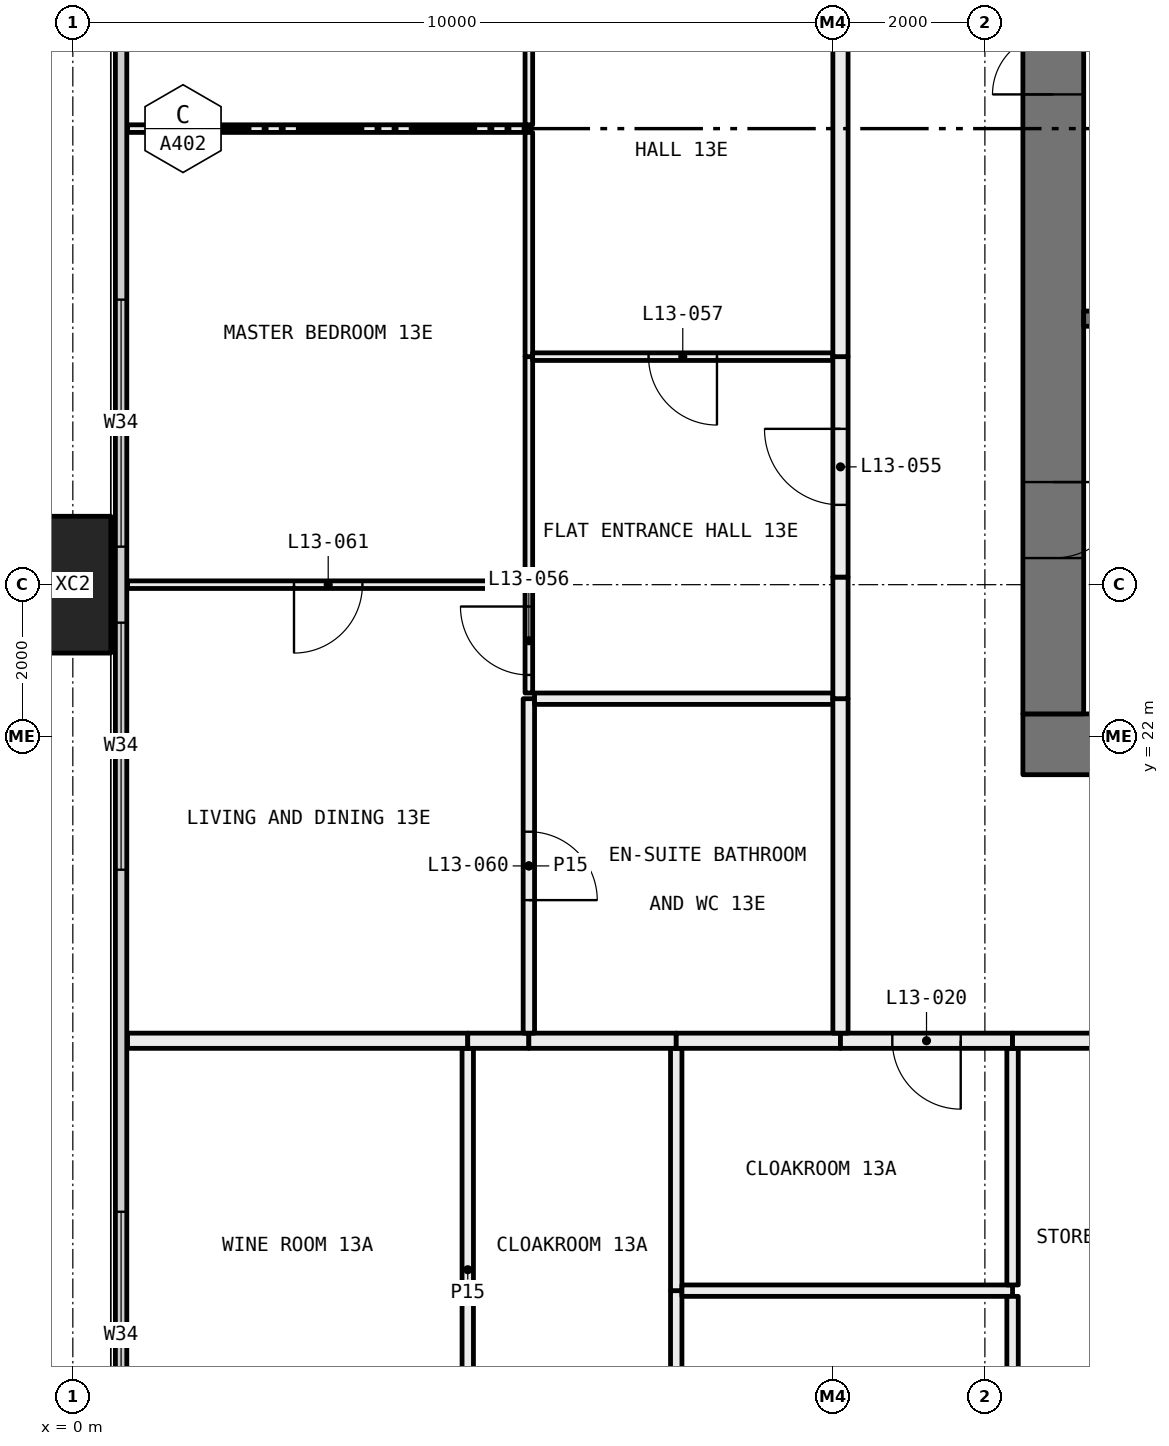
"""IFC4 building model, lengths in metres.
Left out: names, types, materials, properties, quantities, classifications, styles, units other than length and angle.
Written with IfcOpenShell. Run it as: python <this file> out.ifc"""

import sys

from ifc_helpers import new_model, si_unit, direction, frame, frame_2d, origin, origin_2d, place, context, subcontext, project, spatial, rectangle, hollow_rectangle, extrude, element, fill, save


model = new_model("IFC4")
c1 = context("Model", 3, precision=1e-05, world=origin(), true_north=direction((0.0, 1.0)))
c2 = subcontext(c1, "Body", "Model", "MODEL_VIEW")
j1 = project(units=[si_unit("LENGTHUNIT", "METRE"), si_unit("PLANEANGLEUNIT", "RADIAN")], contexts=[c1])
p1 = place(None, origin())
s1 = spatial("IfcSite", under=j1, at=p1, CompositionType="ELEMENT")
p2 = place(p1, origin())
s2 = spatial("IfcBuilding", under=s1, at=p2, CompositionType="ELEMENT")
p3 = place(p2, frame((0.0, 0.0, 57.6)))
s3 = spatial("IfcBuildingStorey", under=s2, at=p3, CompositionType="ELEMENT", Elevation=57.6)
p4 = place(p3, frame((0.0, 24.0, -0.4), z_axis=(0.0, 0.0, 1.0), x_axis=(0.0, 1.0, 0.0)))
e1 = element("IfcColumn", 1, at=p4, inside=s3, PredefinedType="COLUMN", context=c2, shape_type="SweptSolid", body=[
    extrude(hollow_rectangle(XDim=1.8, YDim=1.0, WallThickness=0.07, at=origin_2d()), origin(), (0.0, 0.0, 1.0), 3.45),
])
p5 = place(p3, frame((0.635, 6.71, 0.0), z_axis=(0.0, 0.0, 1.0), x_axis=(0.0, 1.0, 0.0)))
e2 = element("IfcWall", 2, at=p5, inside=s3, PredefinedType="ELEMENTEDWALL", context=c2, shape_type="SweptSolid", body=[
    extrude(rectangle(XDim=34.58, YDim=0.15, at=frame_2d((17.29, 0.0))), origin(), (0.0, 0.0, 1.0), 3.05),
])
p6 = place(p5, frame((0.29, 0.0, 0.45)))
e3 = element("IfcOpeningElement", 3, at=p6, cuts=e2, PredefinedType="OPENING", context=c2, shape_type="SweptSolid", body=[
    extrude(rectangle(XDim=4.5, YDim=2.55, at=frame_2d((2.25, 1.275))), frame((0.0, 0.085, 0.0), z_axis=(0.0, -1.0, 0.0), x_axis=(1.0, 0.0, 0.0)), (0.0, 0.0, 1.0), 0.17),
])
p7 = place(p5, frame((5.79, 0.0, 0.45)))
e4 = element("IfcOpeningElement", 4, at=p7, cuts=e2, PredefinedType="OPENING", context=c2, shape_type="SweptSolid", body=[
    extrude(rectangle(XDim=3.25, YDim=2.55, at=frame_2d((1.625, 1.275))), frame((0.0, 0.085, 0.0), z_axis=(0.0, -1.0, 0.0), x_axis=(1.0, 0.0, 0.0)), (0.0, 0.0, 1.0), 0.17),
])
p8 = place(p5, frame((13.54, 0.0, 0.45)))
e5 = element("IfcOpeningElement", 5, at=p8, cuts=e2, PredefinedType="OPENING", context=c2, shape_type="SweptSolid", body=[
    extrude(rectangle(XDim=3.25, YDim=2.55, at=frame_2d((1.625, 1.275))), frame((0.0, 0.085, 0.0), z_axis=(0.0, -1.0, 0.0), x_axis=(1.0, 0.0, 0.0)), (0.0, 0.0, 1.0), 0.17),
])
p9 = place(p5, frame((17.79, 0.0, 0.45)))
e6 = element("IfcOpeningElement", 6, at=p9, cuts=e2, PredefinedType="OPENING", context=c2, shape_type="SweptSolid", body=[
    extrude(rectangle(XDim=3.25, YDim=2.55, at=frame_2d((1.625, 1.275))), frame((0.0, 0.085, 0.0), z_axis=(0.0, -1.0, 0.0), x_axis=(1.0, 0.0, 0.0)), (0.0, 0.0, 1.0), 0.17),
])
p10 = place(p5, frame((26.79, 0.0, 0.45)))
e7 = element("IfcOpeningElement", 7, at=p10, cuts=e2, PredefinedType="OPENING", context=c2, shape_type="SweptSolid", body=[
    extrude(rectangle(XDim=2.0, YDim=2.55, at=frame_2d((1.0, 1.275))), frame((0.0, 0.085, 0.0), z_axis=(0.0, -1.0, 0.0), x_axis=(1.0, 0.0, 0.0)), (0.0, 0.0, 1.0), 0.17),
])
p11 = place(p5, frame((29.79, 0.0, 0.45)))
e8 = element("IfcOpeningElement", 8, at=p11, cuts=e2, PredefinedType="OPENING", context=c2, shape_type="SweptSolid", body=[
    extrude(rectangle(XDim=4.5, YDim=2.55, at=frame_2d((2.25, 1.275))), frame((0.0, 0.085, 0.0), z_axis=(0.0, -1.0, 0.0), x_axis=(1.0, 0.0, 0.0)), (0.0, 0.0, 1.0), 0.17),
])
p12 = place(p3, frame((5.196, 12.075, 0.0), z_axis=(0.0, 0.0, 1.0), x_axis=(0.0, 1.0, 0.0)))
e9 = element("IfcWall", 9, at=p12, inside=s3, PredefinedType="PARTITIONING", context=c2, shape_type="SweptSolid", body=[
    extrude(rectangle(XDim=5.825, YDim=0.15, at=frame_2d((2.913, 0.0))), origin(), (0.0, 0.0, 1.0), 2.45),
])
p13 = place(p3, frame((5.196, 18.0, 0.0), z_axis=(0.0, 0.0, 1.0), x_axis=(-1.0, 0.0, 0.0)))
e10 = element("IfcWall", 10, at=p13, inside=s3, PredefinedType="PARTITIONING", context=c2, shape_type="SweptSolid", body=[
    extrude(rectangle(XDim=4.476, YDim=0.2, at=frame_2d((2.238, 0.0))), origin(), (0.0, 0.0, 1.0), 3.05),
])
p14 = place(p3, frame((7.939, 12.075, 0.0), z_axis=(0.0, 0.0, 1.0), x_axis=(0.0, 1.0, 0.0)))
e11 = element("IfcWall", 11, at=p14, inside=s3, PredefinedType="PARTITIONING", context=c2, shape_type="SweptSolid", body=[
    extrude(rectangle(XDim=2.637, YDim=0.15, at=frame_2d((1.318, 0.0))), origin(), (0.0, 0.0, 1.0), 2.45),
])
p15 = place(p3, frame((7.939, 14.712, 0.0), z_axis=(0.0, 0.0, 1.0), x_axis=(0.0, 1.0, 0.0)))
e12 = element("IfcWall", 12, at=p15, inside=s3, PredefinedType="PARTITIONING", context=c2, shape_type="SweptSolid", body=[
    extrude(rectangle(XDim=3.188, YDim=0.15, at=frame_2d((1.594, 0.0))), origin(), (0.0, 0.0, 1.0), 3.05),
])
p16 = place(p3, frame((6.0, 18.0, 0.0), z_axis=(0.0, 0.0, 1.0), x_axis=(-1.0, 0.0, 0.0)))
e13 = element("IfcWall", 13, at=p16, inside=s3, PredefinedType="PARTITIONING", context=c2, shape_type="SweptSolid", body=[
    extrude(rectangle(XDim=0.804, YDim=0.2, at=frame_2d((0.402, 0.0))), origin(), (0.0, 0.0, 1.0), 3.05),
])
p17 = place(p3, frame((7.939, 18.0, 0.0), z_axis=(0.0, 0.0, 1.0), x_axis=(-1.0, 0.0, 0.0)))
e14 = element("IfcWall", 14, at=p17, inside=s3, PredefinedType="PARTITIONING", context=c2, shape_type="SweptSolid", body=[
    extrude(rectangle(XDim=1.939, YDim=0.2, at=frame_2d((0.969, 0.0))), origin(), (0.0, 0.0, 1.0), 3.05),
])
p18 = place(p3, frame((12.364, 14.712, 0.0), z_axis=(0.0, 0.0, 1.0), x_axis=(-1.0, 0.0, 0.0)))
e15 = element("IfcWall", 15, at=p18, inside=s3, PredefinedType="PARTITIONING", context=c2, shape_type="SweptSolid", body=[
    extrude(rectangle(XDim=4.35, YDim=0.15, at=frame_2d((2.175, 0.0))), origin(), (0.0, 0.0, 1.0), 3.05),
])
p19 = place(p3, frame((12.364, 12.8, 0.0), z_axis=(0.0, 0.0, 1.0), x_axis=(0.0, 1.0, 0.0)))
e16 = element("IfcWall", 16, at=p19, inside=s3, PredefinedType="PARTITIONING", context=c2, shape_type="SweptSolid", body=[
    extrude(rectangle(XDim=1.837, YDim=0.15, at=frame_2d((0.918, 0.0))), origin(), (0.0, 0.0, 1.0), 3.05),
])
p20 = place(p3, frame((12.364, 14.787, 0.0), z_axis=(0.0, 0.0, 1.0), x_axis=(0.0, 1.0, 0.0)))
e17 = element("IfcWall", 17, at=p20, inside=s3, PredefinedType="PARTITIONING", context=c2, shape_type="SweptSolid", body=[
    extrude(rectangle(XDim=3.113, YDim=0.15, at=frame_2d((1.556, 0.0))), origin(), (0.0, 0.0, 1.0), 3.05),
])
p21 = place(p3, frame((10.1, 18.0, 0.0), z_axis=(0.0, 0.0, 1.0), x_axis=(-1.0, 0.0, 0.0)))
e18 = element("IfcWall", 18, at=p21, inside=s3, PredefinedType="PARTITIONING", context=c2, shape_type="SweptSolid", body=[
    extrude(rectangle(XDim=2.161, YDim=0.2, at=frame_2d((1.081, 0.0))), origin(), (0.0, 0.0, 1.0), 3.05),
])
p22 = place(p3, frame((12.364, 18.0, 0.0), z_axis=(0.0, 0.0, 1.0), x_axis=(-1.0, 0.0, 0.0)))
e19 = element("IfcWall", 19, at=p22, inside=s3, PredefinedType="PARTITIONING", context=c2, shape_type="SweptSolid", body=[
    extrude(rectangle(XDim=2.264, YDim=0.2, at=frame_2d((1.132, 0.0))), origin(), (0.0, 0.0, 1.0), 3.05),
])
p23 = place(p22, frame((0.682, 0.0, 0.0)))
e20 = element("IfcOpeningElement", 20, at=p23, cuts=e19, PredefinedType="OPENING", context=c2, shape_type="SweptSolid", body=[
    extrude(rectangle(XDim=0.9, YDim=2.1, at=frame_2d((0.45, 1.05))), frame((0.0, 0.11, 0.0), z_axis=(0.0, -1.0, 0.0), x_axis=(1.0, 0.0, 0.0)), (0.0, 0.0, 1.0), 0.22),
])
p24 = place(p3, frame((14.364, 18.0, 0.0), z_axis=(0.0, 0.0, 1.0), x_axis=(-1.0, 0.0, 0.0)))
e21 = element("IfcWall", 21, at=p24, inside=s3, PredefinedType="PARTITIONING", context=c2, shape_type="SweptSolid", body=[
    extrude(rectangle(XDim=2.0, YDim=0.2, at=frame_2d((1.0, 0.0))), origin(), (0.0, 0.0, 1.0), 3.05),
])
p25 = place(p3, frame((6.0, 24.0, 0.0), z_axis=(0.0, 0.0, 1.0), x_axis=(-1.0, 0.0, 0.0)))
e22 = element("IfcWall", 22, at=p25, inside=s3, PredefinedType="PARTITIONING", context=c2, shape_type="SweptSolid", body=[
    extrude(rectangle(XDim=5.28, YDim=0.1, at=frame_2d((2.64, 0.0))), origin(), (0.0, 0.0, 1.0), 2.45),
])
p26 = place(p25, frame((2.19, 0.0, 0.0)))
e23 = element("IfcOpeningElement", 23, at=p26, cuts=e22, PredefinedType="OPENING", context=c2, shape_type="SweptSolid", body=[
    extrude(rectangle(XDim=0.9, YDim=2.1, at=frame_2d((0.45, 1.05))), frame((0.0, 0.06, 0.0), z_axis=(0.0, -1.0, 0.0), x_axis=(1.0, 0.0, 0.0)), (0.0, 0.0, 1.0), 0.12),
])
p27 = place(p3, frame((6.0, 18.1, 0.0), z_axis=(0.0, 0.0, 1.0), x_axis=(0.0, 1.0, 0.0)))
e24 = element("IfcWall", 24, at=p27, inside=s3, PredefinedType="PARTITIONING", context=c2, shape_type="SweptSolid", body=[
    extrude(rectangle(XDim=4.4, YDim=0.15, at=frame_2d((2.2, 0.0))), origin(), (0.0, 0.0, 1.0), 3.05),
])
p28 = place(p27, frame((1.75, 0.0, 0.0)))
e25 = element("IfcOpeningElement", 25, at=p28, cuts=e24, PredefinedType="OPENING", context=c2, shape_type="SweptSolid", body=[
    extrude(rectangle(XDim=0.9, YDim=2.1, at=frame_2d((0.45, 1.05))), frame((0.0, 0.085, 0.0), z_axis=(0.0, -1.0, 0.0), x_axis=(1.0, 0.0, 0.0)), (0.0, 0.0, 1.0), 0.17),
])
p29 = place(p3, frame((6.0, 22.575, 0.0), z_axis=(0.0, 0.0, 1.0), x_axis=(0.0, 1.0, 0.0)))
e26 = element("IfcWall", 26, at=p29, inside=s3, PredefinedType="PARTITIONING", context=c2, shape_type="SweptSolid", body=[
    extrude(rectangle(XDim=1.375, YDim=0.1, at=frame_2d((0.688, 0.0))), origin(), (0.0, 0.0, 1.0), 2.45),
])
p30 = place(p29, frame((0.238, 0.0, 0.0)))
e27 = element("IfcOpeningElement", 27, at=p30, cuts=e26, PredefinedType="OPENING", context=c2, shape_type="SweptSolid", body=[
    extrude(rectangle(XDim=0.9, YDim=2.1, at=frame_2d((0.45, 1.05))), frame((0.0, 0.06, 0.0), z_axis=(0.0, -1.0, 0.0), x_axis=(1.0, 0.0, 0.0)), (0.0, 0.0, 1.0), 0.12),
])
p31 = place(p3, frame((6.0, 30.0, 0.0), z_axis=(0.0, 0.0, 1.0), x_axis=(-1.0, 0.0, 0.0)))
e28 = element("IfcWall", 28, at=p31, inside=s3, PredefinedType="PARTITIONING", context=c2, shape_type="SweptSolid", body=[
    extrude(rectangle(XDim=5.28, YDim=0.1, at=frame_2d((2.64, 0.0))), origin(), (0.0, 0.0, 1.0), 3.05),
])
p32 = place(p3, frame((6.0, 24.05, 0.0), z_axis=(0.0, 0.0, 1.0), x_axis=(0.0, 1.0, 0.0)))
e29 = element("IfcWall", 29, at=p32, inside=s3, PredefinedType="PARTITIONING", context=c2, shape_type="SweptSolid", body=[
    extrude(rectangle(XDim=2.95, YDim=0.1, at=frame_2d((1.475, 0.0))), origin(), (0.0, 0.0, 1.0), 2.45),
])
p33 = place(p3, frame((6.0, 27.0, 0.0), z_axis=(0.0, 0.0, 1.0), x_axis=(0.0, 1.0, 0.0)))
e30 = element("IfcWall", 30, at=p33, inside=s3, PredefinedType="PARTITIONING", context=c2, shape_type="SweptSolid", body=[
    extrude(rectangle(XDim=2.95, YDim=0.1, at=frame_2d((1.475, 0.0))), origin(), (0.0, 0.0, 1.0), 3.05),
])
p34 = place(p3, frame((6.0, 30.05, 0.0), z_axis=(0.0, 0.0, 1.0), x_axis=(0.0, 1.0, 0.0)))
e31 = element("IfcWall", 31, at=p34, inside=s3, PredefinedType="PARTITIONING", context=c2, shape_type="SweptSolid", body=[
    extrude(rectangle(XDim=5.9, YDim=0.1, at=frame_2d((2.95, 0.0))), origin(), (0.0, 0.0, 1.0), 2.45),
])
p35 = place(p34, frame((2.5, 0.0, 0.0)))
e32 = element("IfcOpeningElement", 32, at=p35, cuts=e31, PredefinedType="OPENING", context=c2, shape_type="SweptSolid", body=[
    extrude(rectangle(XDim=0.9, YDim=2.1, at=frame_2d((0.45, 1.05))), frame((0.0, 0.06, 0.0), z_axis=(0.0, -1.0, 0.0), x_axis=(1.0, 0.0, 0.0)), (0.0, 0.0, 1.0), 0.12),
])
p36 = place(p3, frame((10.0, 22.5, 0.0), z_axis=(0.0, 0.0, 1.0), x_axis=(-1.0, 0.0, 0.0)))
e33 = element("IfcWall", 33, at=p36, inside=s3, PredefinedType="PARTITIONING", context=c2, shape_type="SweptSolid", body=[
    extrude(rectangle(XDim=3.925, YDim=0.15, at=frame_2d((1.962, 0.0))), origin(), (0.0, 0.0, 1.0), 3.05),
])
p37 = place(p3, frame((10.1, 18.1, 0.0), z_axis=(0.0, 0.0, 1.0), x_axis=(0.0, 1.0, 0.0)))
e34 = element("IfcWall", 34, at=p37, inside=s3, PredefinedType="PARTITIONING", context=c2, shape_type="SweptSolid", body=[
    extrude(rectangle(XDim=4.4, YDim=0.2, at=frame_2d((2.2, 0.0))), origin(), (0.0, 0.0, 1.0), 3.05),
])
p38 = place(p3, frame((10.0, 27.0, 0.0), z_axis=(0.0, 0.0, 1.0), x_axis=(-1.0, 0.0, 0.0)))
e35 = element("IfcWall", 35, at=p38, inside=s3, PredefinedType="PARTITIONING", context=c2, shape_type="SweptSolid", body=[
    extrude(rectangle(XDim=3.95, YDim=0.1, at=frame_2d((1.975, 0.0))), origin(), (0.0, 0.0, 1.0), 3.05),
])
p39 = place(p38, frame((1.525, 0.0, 0.0)))
e36 = element("IfcOpeningElement", 36, at=p39, cuts=e35, PredefinedType="OPENING", context=c2, shape_type="SweptSolid", body=[
    extrude(rectangle(XDim=0.9, YDim=2.1, at=frame_2d((0.45, 1.05))), frame((0.0, 0.06, 0.0), z_axis=(0.0, -1.0, 0.0), x_axis=(1.0, 0.0, 0.0)), (0.0, 0.0, 1.0), 0.12),
])
p40 = place(p3, frame((10.1, 22.5, 0.0), z_axis=(0.0, 0.0, 1.0), x_axis=(0.0, 1.0, 0.0)))
e37 = element("IfcWall", 37, at=p40, inside=s3, PredefinedType="PARTITIONING", context=c2, shape_type="SweptSolid", body=[
    extrude(rectangle(XDim=1.6, YDim=0.2, at=frame_2d((0.8, 0.0))), origin(), (0.0, 0.0, 1.0), 2.45),
])
p41 = place(p3, frame((10.1, 24.1, 0.0), z_axis=(0.0, 0.0, 1.0), x_axis=(0.0, 1.0, 0.0)))
e38 = element("IfcWall", 38, at=p41, inside=s3, PredefinedType="PARTITIONING", context=c2, shape_type="SweptSolid", body=[
    extrude(rectangle(XDim=2.9, YDim=0.2, at=frame_2d((1.45, 0.0))), origin(), (0.0, 0.0, 1.0), 3.05),
])
p42 = place(p41, frame((0.95, 0.0, 0.0)))
e39 = element("IfcOpeningElement", 39, at=p42, cuts=e38, PredefinedType="OPENING", context=c2, shape_type="SweptSolid", body=[
    extrude(rectangle(XDim=1.0, YDim=2.1, at=frame_2d((0.5, 1.05))), frame((0.0, 0.11, 0.0), z_axis=(0.0, -1.0, 0.0), x_axis=(1.0, 0.0, 0.0)), (0.0, 0.0, 1.0), 0.22),
])
p43 = place(p3, frame((10.1, 27.0, 0.0), z_axis=(0.0, 0.0, 1.0), x_axis=(0.0, 1.0, 0.0)))
e40 = element("IfcWall", 40, at=p43, inside=s3, PredefinedType="PARTITIONING", context=c2, shape_type="SweptSolid", body=[
    extrude(rectangle(XDim=9.1, YDim=0.2, at=frame_2d((4.55, 0.0))), origin(), (0.0, 0.0, 1.0), 2.45),
])
p44 = place(p3, frame((12.5, 21.9, 0.0), z_axis=(0.0, 0.0, 1.0), x_axis=(1.0, 0.0, 0.0)))
e41 = element("IfcWall", 41, at=p44, inside=s3, PredefinedType="SHEAR", context=c2, shape_type="SweptSolid", body=[
    extrude(rectangle(XDim=11.0, YDim=0.8, at=frame_2d((5.5, 0.0))), origin(), (0.0, 0.0, 1.0), 3.05),
])
p45 = place(p3, frame((12.9, 22.3, 0.0), z_axis=(0.0, 0.0, 1.0), x_axis=(0.0, 1.0, 0.0)))
e42 = element("IfcWall", 42, at=p45, inside=s3, PredefinedType="SHEAR", context=c2, shape_type="SweptSolid", body=[
    extrude(rectangle(XDim=15.4, YDim=0.8, at=frame_2d((7.7, 0.0))), origin(), (0.0, 0.0, 1.0), 3.05),
])
p46 = place(p45, frame((8.15, 0.0, 0.0)))
e43 = element("IfcOpeningElement", 43, at=p46, cuts=e42, PredefinedType="OPENING", context=c2, shape_type="SweptSolid", body=[
    extrude(rectangle(XDim=1.6, YDim=2.1, at=frame_2d((0.8, 1.05))), frame((0.0, 0.41, 0.0), z_axis=(0.0, -1.0, 0.0), x_axis=(1.0, 0.0, 0.0)), (0.0, 0.0, 1.0), 0.82),
])
p47 = place(p45, frame((2.05, 0.0, 0.0)))
e44 = element("IfcOpeningElement", 44, at=p47, cuts=e42, PredefinedType="OPENING", context=c2, shape_type="SweptSolid", body=[
    extrude(rectangle(XDim=1.0, YDim=2.1, at=frame_2d((0.5, 1.05))), frame((0.0, 0.41, 0.0), z_axis=(0.0, -1.0, 0.0), x_axis=(1.0, 0.0, 0.0)), (0.0, 0.0, 1.0), 0.82),
])
p48 = place(p3, frame((13.3, 27.5, 0.0), z_axis=(0.0, 0.0, 1.0), x_axis=(1.0, 0.0, 0.0)))
e45 = element("IfcWall", 45, at=p48, inside=s3, PredefinedType="SOLIDWALL", context=c2, shape_type="SweptSolid", body=[
    extrude(rectangle(XDim=2.0, YDim=0.2, at=frame_2d((1.0, 0.0))), origin(), (0.0, 0.0, 1.0), 3.05),
])
p49 = place(p48, frame((0.5, 0.0, 0.0)))
e46 = element("IfcOpeningElement", 46, at=p49, cuts=e45, PredefinedType="OPENING", context=c2, shape_type="SweptSolid", body=[
    extrude(rectangle(XDim=1.0, YDim=2.1, at=frame_2d((0.5, 1.05))), frame((0.0, 0.11, 0.0), z_axis=(0.0, -1.0, 0.0), x_axis=(1.0, 0.0, 0.0)), (0.0, 0.0, 1.0), 0.22),
])
p50 = place(p7, origin())
e47 = element("IfcWindow", 47, at=p50, inside=s3, PartitioningType="SINGLE_PANEL", PredefinedType="WINDOW", context=c2, shape_type="SweptSolid", body=[
    extrude(rectangle(XDim=3.25, YDim=2.55, at=frame_2d((1.625, 1.275))), frame((0.0, 0.03, 0.0), z_axis=(0.0, -1.0, 0.0), x_axis=(1.0, 0.0, 0.0)), (0.0, 0.0, 1.0), 0.06),
])
fill(e4, e47)
p51 = place(p8, origin())
e48 = element("IfcWindow", 48, at=p51, inside=s3, PartitioningType="SINGLE_PANEL", PredefinedType="WINDOW", context=c2, shape_type="SweptSolid", body=[
    extrude(rectangle(XDim=3.25, YDim=2.55, at=frame_2d((1.625, 1.275))), frame((0.0, 0.03, 0.0), z_axis=(0.0, -1.0, 0.0), x_axis=(1.0, 0.0, 0.0)), (0.0, 0.0, 1.0), 0.06),
])
fill(e5, e48)
p52 = place(p9, origin())
e49 = element("IfcWindow", 49, at=p52, inside=s3, PartitioningType="SINGLE_PANEL", PredefinedType="WINDOW", context=c2, shape_type="SweptSolid", body=[
    extrude(rectangle(XDim=3.25, YDim=2.55, at=frame_2d((1.625, 1.275))), frame((0.0, 0.03, 0.0), z_axis=(0.0, -1.0, 0.0), x_axis=(1.0, 0.0, 0.0)), (0.0, 0.0, 1.0), 0.06),
])
fill(e6, e49)
p53 = place(p23, origin())
e50 = element("IfcDoor", 50, at=p53, inside=s3, OperationType="SINGLE_SWING_RIGHT", PredefinedType="DOOR", context=c2, shape_type="SweptSolid", body=[
    extrude(rectangle(XDim=0.9, YDim=2.1, at=frame_2d((0.45, 1.05))), frame((0.0, 0.025, 0.0), z_axis=(0.0, -1.0, 0.0), x_axis=(1.0, 0.0, 0.0)), (0.0, 0.0, 1.0), 0.05),
])
fill(e20, e50)
p54 = place(p42, origin())
e51 = element("IfcDoor", 51, at=p54, inside=s3, OperationType="SINGLE_SWING_LEFT", PredefinedType="DOOR", context=c2, shape_type="SweptSolid", body=[
    extrude(rectangle(XDim=1.0, YDim=2.1, at=frame_2d((0.5, 1.05))), frame((0.0, 0.025, 0.0), z_axis=(0.0, -1.0, 0.0), x_axis=(1.0, 0.0, 0.0)), (0.0, 0.0, 1.0), 0.05),
])
fill(e39, e51)
p55 = place(p30, origin())
e52 = element("IfcDoor", 52, at=p55, inside=s3, OperationType="SINGLE_SWING_LEFT", PredefinedType="DOOR", context=c2, shape_type="SweptSolid", body=[
    extrude(rectangle(XDim=0.9, YDim=2.1, at=frame_2d((0.45, 1.05))), frame((0.0, 0.025, 0.0), z_axis=(0.0, -1.0, 0.0), x_axis=(1.0, 0.0, 0.0)), (0.0, 0.0, 1.0), 0.05),
])
fill(e27, e52)
p56 = place(p39, origin())
e53 = element("IfcDoor", 53, at=p56, inside=s3, OperationType="SINGLE_SWING_RIGHT", PredefinedType="DOOR", context=c2, shape_type="SweptSolid", body=[
    extrude(rectangle(XDim=0.9, YDim=2.1, at=frame_2d((0.45, 1.05))), frame((0.0, 0.025, 0.0), z_axis=(0.0, -1.0, 0.0), x_axis=(1.0, 0.0, 0.0)), (0.0, 0.0, 1.0), 0.05),
])
fill(e36, e53)
p57 = place(p28, frame((0.9, 0.0, 0.0), x_axis=(-1.0, 0.0, 0.0)))
e54 = element("IfcDoor", 54, at=p57, inside=s3, OperationType="SINGLE_SWING_LEFT", PredefinedType="DOOR", context=c2, shape_type="SweptSolid", body=[
    extrude(rectangle(XDim=0.9, YDim=2.1, at=frame_2d((0.45, 1.05))), frame((0.0, 0.025, 0.0), z_axis=(0.0, -1.0, 0.0), x_axis=(1.0, 0.0, 0.0)), (0.0, 0.0, 1.0), 0.05),
])
fill(e25, e54)
p58 = place(p26, origin())
e55 = element("IfcDoor", 55, at=p58, inside=s3, OperationType="SINGLE_SWING_LEFT", PredefinedType="DOOR", context=c2, shape_type="SweptSolid", body=[
    extrude(rectangle(XDim=0.9, YDim=2.1, at=frame_2d((0.45, 1.05))), frame((0.0, 0.025, 0.0), z_axis=(0.0, -1.0, 0.0), x_axis=(1.0, 0.0, 0.0)), (0.0, 0.0, 1.0), 0.05),
])
fill(e23, e55)
p59 = place(p46, origin())
e56 = element("IfcDoor", 56, at=p59, inside=s3, OperationType="DOUBLE_DOOR_SINGLE_SWING", PredefinedType="DOOR", context=c2, shape_type="SweptSolid", body=[
    extrude(rectangle(XDim=1.6, YDim=2.1, at=frame_2d((0.8, 1.05))), frame((0.0, 0.025, 0.0), z_axis=(0.0, -1.0, 0.0), x_axis=(1.0, 0.0, 0.0)), (0.0, 0.0, 1.0), 0.05),
])
fill(e43, e56)
p60 = place(p47, frame((1.0, 0.0, 0.0), x_axis=(-1.0, 0.0, 0.0)))
e57 = element("IfcDoor", 57, at=p60, inside=s3, OperationType="SINGLE_SWING_RIGHT", PredefinedType="DOOR", context=c2, shape_type="SweptSolid", body=[
    extrude(rectangle(XDim=1.0, YDim=2.1, at=frame_2d((0.5, 1.05))), frame((0.0, 0.025, 0.0), z_axis=(0.0, -1.0, 0.0), x_axis=(1.0, 0.0, 0.0)), (0.0, 0.0, 1.0), 0.05),
])
fill(e44, e57)
save(model, sys.argv[1])
